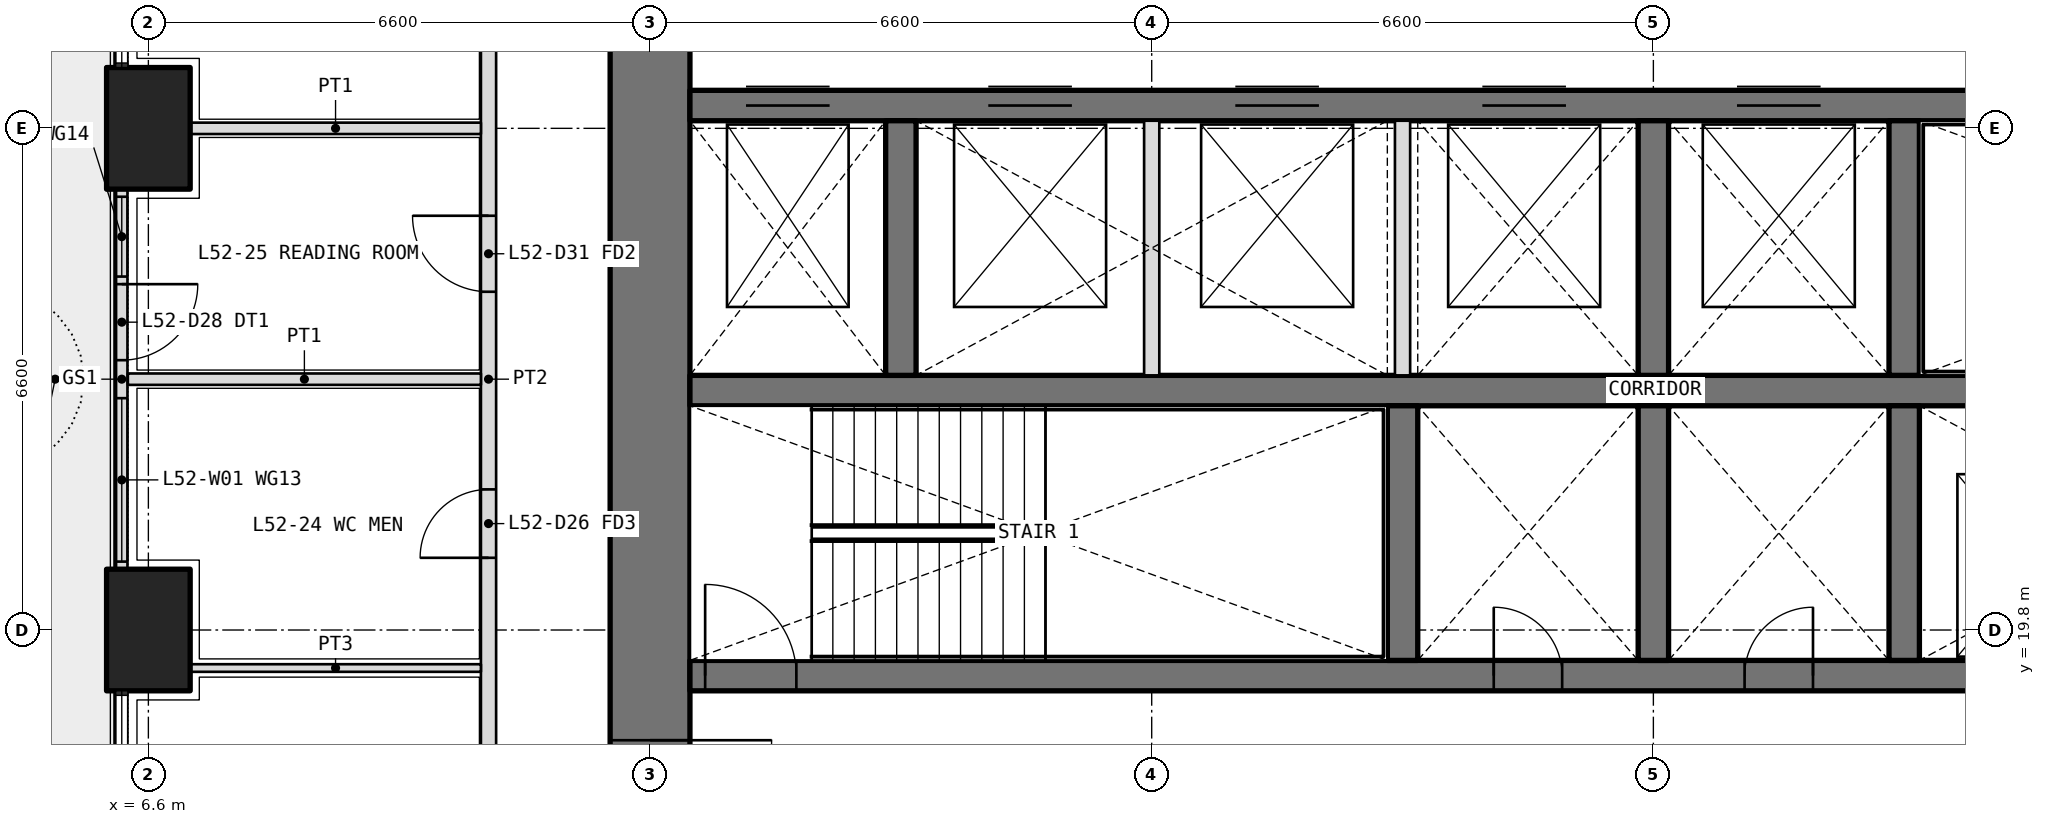
"""IFC4 building model, lengths in metres.
Left out: names, types, materials, properties, quantities, classifications, styles, units other than length and angle.
Written with IfcOpenShell. Run it as: python <this file> out.ifc"""

import sys

from ifc_helpers import new_model, si_unit, direction, frame, frame_2d, origin, origin_2d, place, context, subcontext, project, spatial, rectangle, extrude, element, fill, save


model = new_model("IFC4")
c1 = context("Model", 3, precision=1e-05, world=origin(), true_north=direction((0.0, 1.0)))
c2 = subcontext(c1, "Body", "Model", "MODEL_VIEW")
j1 = project(units=[si_unit("LENGTHUNIT", "METRE"), si_unit("PLANEANGLEUNIT", "RADIAN")], contexts=[c1])
p1 = place(None, origin())
s1 = spatial("IfcSite", under=j1, at=p1, CompositionType="ELEMENT")
p2 = place(p1, origin())
s2 = spatial("IfcBuilding", under=s1, at=p2, CompositionType="ELEMENT")
p3 = place(p2, frame((0.0, 0.0, 229.2)))
s3 = spatial("IfcBuildingStorey", under=s2, at=p3, CompositionType="ELEMENT", Elevation=229.2)
for number, where, z_axis, x_axis in (
    (1, (6.6, 19.8, 0.0), (0.0, 0.0, 1.0), (0.0, 1.0, 0.0)),
    (2, (6.6, 26.4, 0.0), (0.0, 0.0, 1.0), (0.0, 1.0, 0.0)),
):
    element("IfcColumn", number, at=place(p3, frame(where, z_axis=z_axis, x_axis=x_axis)), inside=s3, PredefinedType="COLUMN", context=c2, shape_type="SweptSolid", body=[
        extrude(rectangle(XDim=1.6, YDim=1.1, at=origin_2d()), origin(), (0.0, 0.0, 1.0), 4.2),
    ])
p4 = place(p3, frame((6.25, 25.6, 0.0), z_axis=(0.0, 0.0, 1.0), x_axis=(0.0, -1.0, 0.0)))
e3 = element("IfcWall", 3, at=p4, inside=s3, PredefinedType="SOLIDWALL", context=c2, shape_type="SweptSolid", body=[
    extrude(rectangle(XDim=5.0, YDim=0.15, at=frame_2d((2.5, 0.0))), origin(), (0.0, 0.0, 1.0), 2.7),
])
p5 = place(p4, frame((1.25, 0.0, 0.0)))
e4 = element("IfcOpeningElement", 4, at=p5, cuts=e3, PredefinedType="OPENING", context=c2, shape_type="SweptSolid", body=[
    extrude(rectangle(XDim=1.0, YDim=2.4, at=frame_2d((0.5, 1.2))), frame((0.0, 0.085, 0.0), z_axis=(0.0, -1.0, 0.0), x_axis=(1.0, 0.0, 0.0)), (0.0, 0.0, 1.0), 0.17),
])
p6 = place(p4, frame((0.1, 0.0, 0.1)))
e5 = element("IfcOpeningElement", 5, at=p6, cuts=e3, PredefinedType="OPENING", context=c2, shape_type="SweptSolid", body=[
    extrude(rectangle(XDim=1.05, YDim=2.3, at=frame_2d((0.525, 1.15))), frame((0.0, 0.085, 0.0), z_axis=(0.0, -1.0, 0.0), x_axis=(1.0, 0.0, 0.0)), (0.0, 0.0, 1.0), 0.17),
])
p7 = place(p4, frame((2.75, 0.0, 0.1)))
e6 = element("IfcOpeningElement", 6, at=p7, cuts=e3, PredefinedType="OPENING", context=c2, shape_type="SweptSolid", body=[
    extrude(rectangle(XDim=2.15, YDim=2.3, at=frame_2d((1.075, 1.15))), frame((0.0, 0.085, 0.0), z_axis=(0.0, -1.0, 0.0), x_axis=(1.0, 0.0, 0.0)), (0.0, 0.0, 1.0), 0.17),
])
p8 = place(p3, frame((13.2, 32.475, 0.0), z_axis=(0.0, 0.0, 1.0), x_axis=(0.0, -1.0, 0.0)))
e7 = element("IfcWall", 7, at=p8, inside=s3, PredefinedType="SHEAR", context=c2, shape_type="SweptSolid", body=[
    extrude(rectangle(XDim=18.75, YDim=1.05, at=frame_2d((9.375, 0.0))), origin(), (0.0, 0.0, 1.0), 4.2),
])
p9 = place(p8, frame((14.125, 0.0, 0.0)))
e8 = element("IfcOpeningElement", 8, at=p9, cuts=e7, PredefinedType="OPENING", context=c2, shape_type="SweptSolid", body=[
    extrude(rectangle(XDim=1.6, YDim=2.1, at=frame_2d((0.8, 1.05))), frame((0.0, 0.535, 0.0), z_axis=(0.0, -1.0, 0.0), x_axis=(1.0, 0.0, 0.0)), (0.0, 0.0, 1.0), 1.07),
])
p10 = place(p8, frame((3.325, 0.0, 0.0)))
e9 = element("IfcOpeningElement", 9, at=p10, cuts=e7, PredefinedType="OPENING", context=c2, shape_type="SweptSolid", body=[
    extrude(rectangle(XDim=1.6, YDim=2.1, at=frame_2d((0.8, 1.05))), frame((0.0, 0.535, 0.0), z_axis=(0.0, -1.0, 0.0), x_axis=(1.0, 0.0, 0.0)), (0.0, 0.0, 1.0), 1.07),
])
p11 = place(p3, frame((13.725, 19.2, 0.0), z_axis=(0.0, 0.0, 1.0), x_axis=(1.0, 0.0, 0.0)))
e10 = element("IfcWall", 10, at=p11, inside=s3, PredefinedType="SHEAR", context=c2, shape_type="SweptSolid", body=[
    extrude(rectangle(XDim=25.35, YDim=0.4, at=frame_2d((12.675, 0.0))), origin(), (0.0, 0.0, 1.0), 4.2),
])
p12 = place(p11, frame((10.575, 0.0, 0.0)))
e11 = element("IfcOpeningElement", 11, at=p12, cuts=e10, PredefinedType="OPENING", context=c2, shape_type="SweptSolid", body=[
    extrude(rectangle(XDim=0.9, YDim=2.1, at=frame_2d((0.45, 1.05))), frame((0.0, 0.21, 0.0), z_axis=(0.0, -1.0, 0.0), x_axis=(1.0, 0.0, 0.0)), (0.0, 0.0, 1.0), 0.42),
])
p13 = place(p11, frame((13.875, 0.0, 0.0)))
e12 = element("IfcOpeningElement", 12, at=p13, cuts=e10, PredefinedType="OPENING", context=c2, shape_type="SweptSolid", body=[
    extrude(rectangle(XDim=0.9, YDim=2.1, at=frame_2d((0.45, 1.05))), frame((0.0, 0.21, 0.0), z_axis=(0.0, -1.0, 0.0), x_axis=(1.0, 0.0, 0.0)), (0.0, 0.0, 1.0), 0.42),
])
p14 = place(p11, frame((0.2, 0.0, 0.0)))
e13 = element("IfcOpeningElement", 13, at=p14, cuts=e10, PredefinedType="OPENING", context=c2, shape_type="SweptSolid", body=[
    extrude(rectangle(XDim=1.2, YDim=2.1, at=frame_2d((0.6, 1.05))), frame((0.0, 0.21, 0.0), z_axis=(0.0, -1.0, 0.0), x_axis=(1.0, 0.0, 0.0)), (0.0, 0.0, 1.0), 0.42),
])
p15 = place(p11, frame((23.512, 0.0, 0.0)))
e14 = element("IfcOpeningElement", 14, at=p15, cuts=e10, PredefinedType="OPENING", context=c2, shape_type="SweptSolid", body=[
    extrude(rectangle(XDim=1.1, YDim=2.1, at=frame_2d((0.55, 1.05))), frame((0.0, 0.21, 0.0), z_axis=(0.0, -1.0, 0.0), x_axis=(1.0, 0.0, 0.0)), (0.0, 0.0, 1.0), 0.42),
])
p16 = place(p11, frame((17.125, 0.0, 0.0)))
e15 = element("IfcOpeningElement", 15, at=p16, cuts=e10, PredefinedType="OPENING", context=c2, shape_type="SweptSolid", body=[
    extrude(rectangle(XDim=1.1, YDim=2.1, at=frame_2d((0.55, 1.05))), frame((0.0, 0.21, 0.0), z_axis=(0.0, -1.0, 0.0), x_axis=(1.0, 0.0, 0.0)), (0.0, 0.0, 1.0), 0.42),
])
p17 = place(p11, frame((20.325, 0.0, 0.0)))
e16 = element("IfcOpeningElement", 16, at=p17, cuts=e10, PredefinedType="OPENING", context=c2, shape_type="SweptSolid", body=[
    extrude(rectangle(XDim=1.1, YDim=2.1, at=frame_2d((0.55, 1.05))), frame((0.0, 0.21, 0.0), z_axis=(0.0, -1.0, 0.0), x_axis=(1.0, 0.0, 0.0)), (0.0, 0.0, 1.0), 0.42),
])
p18 = place(p3, frame((13.725, 22.95, 0.0), z_axis=(0.0, 0.0, 1.0), x_axis=(1.0, 0.0, 0.0)))
e17 = element("IfcWall", 17, at=p18, inside=s3, PredefinedType="SHEAR", context=c2, shape_type="SweptSolid", body=[
    extrude(rectangle(XDim=25.35, YDim=0.4, at=frame_2d((12.675, 0.0))), origin(), (0.0, 0.0, 1.0), 4.2),
])
p19 = place(p3, frame((13.725, 26.7, 0.0), z_axis=(0.0, 0.0, 1.0), x_axis=(1.0, 0.0, 0.0)))
e18 = element("IfcWall", 18, at=p19, inside=s3, PredefinedType="SHEAR", context=c2, shape_type="SweptSolid", body=[
    extrude(rectangle(XDim=25.35, YDim=0.4, at=frame_2d((12.675, 0.0))), origin(), (0.0, 0.0, 1.0), 4.2),
])
p20 = place(p19, frame((23.95, 0.0, 0.0)))
e19 = element("IfcOpeningElement", 19, at=p20, cuts=e18, PredefinedType="OPENING", context=c2, shape_type="SweptSolid", body=[
    extrude(rectangle(XDim=1.2, YDim=2.1, at=frame_2d((0.6, 1.05))), frame((0.0, 0.21, 0.0), z_axis=(0.0, -1.0, 0.0), x_axis=(1.0, 0.0, 0.0)), (0.0, 0.0, 1.0), 0.42),
])
p21 = place(p19, frame((0.738, 0.0, 0.0)))
e20 = element("IfcOpeningElement", 20, at=p21, cuts=e18, PredefinedType="OPENING", context=c2, shape_type="SweptSolid", body=[
    extrude(rectangle(XDim=1.1, YDim=2.1, at=frame_2d((0.55, 1.05))), frame((0.0, 0.21, 0.0), z_axis=(0.0, -1.0, 0.0), x_axis=(1.0, 0.0, 0.0)), (0.0, 0.0, 1.0), 0.42),
])
p22 = place(p19, frame((3.925, 0.0, 0.0)))
e21 = element("IfcOpeningElement", 21, at=p22, cuts=e18, PredefinedType="OPENING", context=c2, shape_type="SweptSolid", body=[
    extrude(rectangle(XDim=1.1, YDim=2.1, at=frame_2d((0.55, 1.05))), frame((0.0, 0.21, 0.0), z_axis=(0.0, -1.0, 0.0), x_axis=(1.0, 0.0, 0.0)), (0.0, 0.0, 1.0), 0.42),
])
p23 = place(p19, frame((7.175, 0.0, 0.0)))
e22 = element("IfcOpeningElement", 22, at=p23, cuts=e18, PredefinedType="OPENING", context=c2, shape_type="SweptSolid", body=[
    extrude(rectangle(XDim=1.1, YDim=2.1, at=frame_2d((0.55, 1.05))), frame((0.0, 0.21, 0.0), z_axis=(0.0, -1.0, 0.0), x_axis=(1.0, 0.0, 0.0)), (0.0, 0.0, 1.0), 0.42),
])
p24 = place(p19, frame((10.425, 0.0, 0.0)))
e23 = element("IfcOpeningElement", 23, at=p24, cuts=e18, PredefinedType="OPENING", context=c2, shape_type="SweptSolid", body=[
    extrude(rectangle(XDim=1.1, YDim=2.1, at=frame_2d((0.55, 1.05))), frame((0.0, 0.21, 0.0), z_axis=(0.0, -1.0, 0.0), x_axis=(1.0, 0.0, 0.0)), (0.0, 0.0, 1.0), 0.42),
])
p25 = place(p19, frame((13.775, 0.0, 0.0)))
e24 = element("IfcOpeningElement", 24, at=p25, cuts=e18, PredefinedType="OPENING", context=c2, shape_type="SweptSolid", body=[
    extrude(rectangle(XDim=1.1, YDim=2.1, at=frame_2d((0.55, 1.05))), frame((0.0, 0.21, 0.0), z_axis=(0.0, -1.0, 0.0), x_axis=(1.0, 0.0, 0.0)), (0.0, 0.0, 1.0), 0.42),
])
for number, where, z_axis, x_axis in (
    (25, (23.1, 19.4, 0.0), (0.0, 0.0, 1.0), (0.0, 1.0, 0.0)),
    (26, (26.4, 19.4, 0.0), (0.0, 0.0, 1.0), (0.0, 1.0, 0.0)),
    (27, (29.7, 19.4, 0.0), (0.0, 0.0, 1.0), (0.0, 1.0, 0.0)),
    (28, (16.5, 23.15, 0.0), (0.0, 0.0, 1.0), (0.0, 1.0, 0.0)),
    (29, (26.4, 23.15, 0.0), (0.0, 0.0, 1.0), (0.0, 1.0, 0.0)),
    (30, (29.7, 23.15, 0.0), (0.0, 0.0, 1.0), (0.0, 1.0, 0.0)),
):
    element("IfcWall", number, at=place(p3, frame(where, z_axis=z_axis, x_axis=x_axis)), inside=s3, PredefinedType="SHEAR", context=c2, shape_type="SweptSolid", body=[
        extrude(rectangle(XDim=3.35, YDim=0.4, at=frame_2d((1.675, 0.0))), origin(), (0.0, 0.0, 1.0), 4.2),
    ])
for number, where, z_axis, x_axis in (
    (31, (19.8, 23.15, 0.0), (0.0, 0.0, 1.0), (0.0, 1.0, 0.0)),
    (32, (23.1, 23.15, 0.0), (0.0, 0.0, 1.0), (0.0, 1.0, 0.0)),
):
    element("IfcWall", number, at=place(p3, frame(where, z_axis=z_axis, x_axis=x_axis)), inside=s3, PredefinedType="PARTITIONING", context=c2, shape_type="SweptSolid", body=[
        extrude(rectangle(XDim=3.35, YDim=0.2, at=frame_2d((1.675, 0.0))), origin(), (0.0, 0.0, 1.0), 4.2),
    ])
p26 = place(p3, frame((11.075, 7.4, 0.0), z_axis=(0.0, 0.0, 1.0), x_axis=(0.0, 1.0, 0.0)))
e33 = element("IfcWall", 33, at=p26, inside=s3, PredefinedType="PARTITIONING", context=c2, shape_type="SweptSolid", body=[
    extrude(rectangle(XDim=31.4, YDim=0.2, at=frame_2d((15.7, 0.0))), origin(), (0.0, 0.0, 1.0), 3.0),
])
p27 = place(p26, frame((2.35, 0.0, 0.0)))
e34 = element("IfcOpeningElement", 34, at=p27, cuts=e33, PredefinedType="OPENING", context=c2, shape_type="SweptSolid", body=[
    extrude(rectangle(XDim=1.0, YDim=2.1, at=frame_2d((0.5, 1.05))), frame((0.0, 0.11, 0.0), z_axis=(0.0, -1.0, 0.0), x_axis=(1.0, 0.0, 0.0)), (0.0, 0.0, 1.0), 0.22),
])
p28 = place(p26, frame((6.35, 0.0, 0.0)))
e35 = element("IfcOpeningElement", 35, at=p28, cuts=e33, PredefinedType="OPENING", context=c2, shape_type="SweptSolid", body=[
    extrude(rectangle(XDim=1.0, YDim=2.1, at=frame_2d((0.5, 1.05))), frame((0.0, 0.11, 0.0), z_axis=(0.0, -1.0, 0.0), x_axis=(1.0, 0.0, 0.0)), (0.0, 0.0, 1.0), 0.22),
])
p29 = place(p26, frame((9.45, 0.0, 0.0)))
e36 = element("IfcOpeningElement", 36, at=p29, cuts=e33, PredefinedType="OPENING", context=c2, shape_type="SweptSolid", body=[
    extrude(rectangle(XDim=0.9, YDim=2.1, at=frame_2d((0.45, 1.05))), frame((0.0, 0.11, 0.0), z_axis=(0.0, -1.0, 0.0), x_axis=(1.0, 0.0, 0.0)), (0.0, 0.0, 1.0), 0.22),
])
p30 = place(p26, frame((13.35, 0.0, 0.0)))
e37 = element("IfcOpeningElement", 37, at=p30, cuts=e33, PredefinedType="OPENING", context=c2, shape_type="SweptSolid", body=[
    extrude(rectangle(XDim=0.9, YDim=2.1, at=frame_2d((0.45, 1.05))), frame((0.0, 0.11, 0.0), z_axis=(0.0, -1.0, 0.0), x_axis=(1.0, 0.0, 0.0)), (0.0, 0.0, 1.0), 0.22),
])
p31 = place(p26, frame((16.85, 0.0, 0.0)))
e38 = element("IfcOpeningElement", 38, at=p31, cuts=e33, PredefinedType="OPENING", context=c2, shape_type="SweptSolid", body=[
    extrude(rectangle(XDim=1.0, YDim=2.1, at=frame_2d((0.5, 1.05))), frame((0.0, 0.11, 0.0), z_axis=(0.0, -1.0, 0.0), x_axis=(1.0, 0.0, 0.0)), (0.0, 0.0, 1.0), 0.22),
])
p32 = place(p26, frame((21.8, 0.0, 0.0)))
e39 = element("IfcOpeningElement", 39, at=p32, cuts=e33, PredefinedType="OPENING", context=c2, shape_type="SweptSolid", body=[
    extrude(rectangle(XDim=1.0, YDim=2.1, at=frame_2d((0.5, 1.05))), frame((0.0, 0.11, 0.0), z_axis=(0.0, -1.0, 0.0), x_axis=(1.0, 0.0, 0.0)), (0.0, 0.0, 1.0), 0.22),
])
p33 = place(p26, frame((28.05, 0.0, 0.0)))
e40 = element("IfcOpeningElement", 40, at=p33, cuts=e33, PredefinedType="OPENING", context=c2, shape_type="SweptSolid", body=[
    extrude(rectangle(XDim=1.0, YDim=2.1, at=frame_2d((0.5, 1.05))), frame((0.0, 0.11, 0.0), z_axis=(0.0, -1.0, 0.0), x_axis=(1.0, 0.0, 0.0)), (0.0, 0.0, 1.0), 0.22),
])
p34 = place(p3, frame((7.15, 19.3, 0.0), z_axis=(0.0, 0.0, 1.0), x_axis=(1.0, 0.0, 0.0)))
e41 = element("IfcWall", 41, at=p34, inside=s3, PredefinedType="PARTITIONING", context=c2, shape_type="SweptSolid", body=[
    extrude(rectangle(XDim=3.825, YDim=0.1, at=frame_2d((1.913, 0.0))), origin(), (0.0, 0.0, 1.0), 3.0),
])
p35 = place(p3, frame((6.33, 23.1, 0.0), z_axis=(0.0, 0.0, 1.0), x_axis=(1.0, 0.0, 0.0)))
e42 = element("IfcWall", 42, at=p35, inside=s3, PredefinedType="PARTITIONING", context=c2, shape_type="SweptSolid", body=[
    extrude(rectangle(XDim=4.645, YDim=0.15, at=frame_2d((2.323, 0.0))), origin(), (0.0, 0.0, 1.0), 2.7),
])
p36 = place(p3, frame((7.15, 26.4, 0.0), z_axis=(0.0, 0.0, 1.0), x_axis=(1.0, 0.0, 0.0)))
e43 = element("IfcWall", 43, at=p36, inside=s3, PredefinedType="PARTITIONING", context=c2, shape_type="SweptSolid", body=[
    extrude(rectangle(XDim=3.825, YDim=0.15, at=frame_2d((1.913, 0.0))), origin(), (0.0, 0.0, 1.0), 3.0),
])
p37 = place(p5, origin())
e44 = element("IfcDoor", 44, at=p37, inside=s3, OperationType="SINGLE_SWING_LEFT", PredefinedType="DOOR", context=c2, shape_type="SweptSolid", body=[
    extrude(rectangle(XDim=1.0, YDim=2.4, at=frame_2d((0.5, 1.2))), frame((0.0, 0.025, 0.0), z_axis=(0.0, -1.0, 0.0), x_axis=(1.0, 0.0, 0.0)), (0.0, 0.0, 1.0), 0.05),
])
fill(e4, e44)
p38 = place(p6, origin())
e45 = element("IfcWindow", 45, at=p38, inside=s3, PartitioningType="SINGLE_PANEL", PredefinedType="WINDOW", context=c2, shape_type="SweptSolid", body=[
    extrude(rectangle(XDim=1.05, YDim=2.3, at=frame_2d((0.525, 1.15))), frame((0.0, 0.03, 0.0), z_axis=(0.0, -1.0, 0.0), x_axis=(1.0, 0.0, 0.0)), (0.0, 0.0, 1.0), 0.06),
])
fill(e5, e45)
p39 = place(p7, origin())
e46 = element("IfcWindow", 46, at=p39, inside=s3, PartitioningType="SINGLE_PANEL", PredefinedType="WINDOW", context=c2, shape_type="SweptSolid", body=[
    extrude(rectangle(XDim=2.15, YDim=2.3, at=frame_2d((1.075, 1.15))), frame((0.0, 0.03, 0.0), z_axis=(0.0, -1.0, 0.0), x_axis=(1.0, 0.0, 0.0)), (0.0, 0.0, 1.0), 0.06),
])
fill(e6, e46)
p40 = place(p30, origin())
e47 = element("IfcDoor", 47, at=p40, inside=s3, OperationType="SINGLE_SWING_LEFT", PredefinedType="DOOR", context=c2, shape_type="SweptSolid", body=[
    extrude(rectangle(XDim=0.9, YDim=2.1, at=frame_2d((0.45, 1.05))), frame((0.0, 0.025, 0.0), z_axis=(0.0, -1.0, 0.0), x_axis=(1.0, 0.0, 0.0)), (0.0, 0.0, 1.0), 0.05),
])
fill(e37, e47)
p41 = place(p31, origin())
e48 = element("IfcDoor", 48, at=p41, inside=s3, OperationType="SINGLE_SWING_RIGHT", PredefinedType="DOOR", context=c2, shape_type="SweptSolid", body=[
    extrude(rectangle(XDim=1.0, YDim=2.1, at=frame_2d((0.5, 1.05))), frame((0.0, 0.025, 0.0), z_axis=(0.0, -1.0, 0.0), x_axis=(1.0, 0.0, 0.0)), (0.0, 0.0, 1.0), 0.05),
])
fill(e38, e48)
p42 = place(p12, origin())
e49 = element("IfcDoor", 49, at=p42, inside=s3, OperationType="SINGLE_SWING_LEFT", PredefinedType="DOOR", context=c2, shape_type="SweptSolid", body=[
    extrude(rectangle(XDim=0.9, YDim=2.1, at=frame_2d((0.45, 1.05))), frame((0.0, 0.025, 0.0), z_axis=(0.0, -1.0, 0.0), x_axis=(1.0, 0.0, 0.0)), (0.0, 0.0, 1.0), 0.05),
])
fill(e11, e49)
p43 = place(p13, origin())
e50 = element("IfcDoor", 50, at=p43, inside=s3, OperationType="SINGLE_SWING_RIGHT", PredefinedType="DOOR", context=c2, shape_type="SweptSolid", body=[
    extrude(rectangle(XDim=0.9, YDim=2.1, at=frame_2d((0.45, 1.05))), frame((0.0, 0.025, 0.0), z_axis=(0.0, -1.0, 0.0), x_axis=(1.0, 0.0, 0.0)), (0.0, 0.0, 1.0), 0.05),
])
fill(e12, e50)
p44 = place(p14, origin())
e51 = element("IfcDoor", 51, at=p44, inside=s3, OperationType="SINGLE_SWING_LEFT", PredefinedType="DOOR", context=c2, shape_type="SweptSolid", body=[
    extrude(rectangle(XDim=1.2, YDim=2.1, at=frame_2d((0.6, 1.05))), frame((0.0, 0.025, 0.0), z_axis=(0.0, -1.0, 0.0), x_axis=(1.0, 0.0, 0.0)), (0.0, 0.0, 1.0), 0.05),
])
fill(e13, e51)
p45 = place(p9, origin())
e52 = element("IfcDoor", 52, at=p45, inside=s3, OperationType="DOUBLE_DOOR_DOUBLE_SWING", PredefinedType="DOOR", context=c2, shape_type="SweptSolid", body=[
    extrude(rectangle(XDim=1.6, YDim=2.1, at=frame_2d((0.8, 1.05))), frame((0.0, 0.025, 0.0), z_axis=(0.0, -1.0, 0.0), x_axis=(1.0, 0.0, 0.0)), (0.0, 0.0, 1.0), 0.05),
])
fill(e8, e52)
p46 = place(p21, origin())
e53 = element("IfcDoor", 53, at=p46, inside=s3, OperationType="DOUBLE_DOOR_SLIDING", PredefinedType="DOOR", context=c2, shape_type="SweptSolid", body=[
    extrude(rectangle(XDim=1.1, YDim=2.1, at=frame_2d((0.55, 1.05))), frame((0.0, 0.025, 0.0), z_axis=(0.0, -1.0, 0.0), x_axis=(1.0, 0.0, 0.0)), (0.0, 0.0, 1.0), 0.05),
])
fill(e20, e53)
p47 = place(p22, origin())
e54 = element("IfcDoor", 54, at=p47, inside=s3, OperationType="DOUBLE_DOOR_SLIDING", PredefinedType="DOOR", context=c2, shape_type="SweptSolid", body=[
    extrude(rectangle(XDim=1.1, YDim=2.1, at=frame_2d((0.55, 1.05))), frame((0.0, 0.025, 0.0), z_axis=(0.0, -1.0, 0.0), x_axis=(1.0, 0.0, 0.0)), (0.0, 0.0, 1.0), 0.05),
])
fill(e21, e54)
p48 = place(p23, origin())
e55 = element("IfcDoor", 55, at=p48, inside=s3, OperationType="DOUBLE_DOOR_SLIDING", PredefinedType="DOOR", context=c2, shape_type="SweptSolid", body=[
    extrude(rectangle(XDim=1.1, YDim=2.1, at=frame_2d((0.55, 1.05))), frame((0.0, 0.025, 0.0), z_axis=(0.0, -1.0, 0.0), x_axis=(1.0, 0.0, 0.0)), (0.0, 0.0, 1.0), 0.05),
])
fill(e22, e55)
p49 = place(p24, origin())
e56 = element("IfcDoor", 56, at=p49, inside=s3, OperationType="DOUBLE_DOOR_SLIDING", PredefinedType="DOOR", context=c2, shape_type="SweptSolid", body=[
    extrude(rectangle(XDim=1.1, YDim=2.1, at=frame_2d((0.55, 1.05))), frame((0.0, 0.025, 0.0), z_axis=(0.0, -1.0, 0.0), x_axis=(1.0, 0.0, 0.0)), (0.0, 0.0, 1.0), 0.05),
])
fill(e23, e56)
p50 = place(p25, origin())
e57 = element("IfcDoor", 57, at=p50, inside=s3, OperationType="DOUBLE_DOOR_SLIDING", PredefinedType="DOOR", context=c2, shape_type="SweptSolid", body=[
    extrude(rectangle(XDim=1.1, YDim=2.1, at=frame_2d((0.55, 1.05))), frame((0.0, 0.025, 0.0), z_axis=(0.0, -1.0, 0.0), x_axis=(1.0, 0.0, 0.0)), (0.0, 0.0, 1.0), 0.05),
])
fill(e24, e57)
save(model, sys.argv[1])
